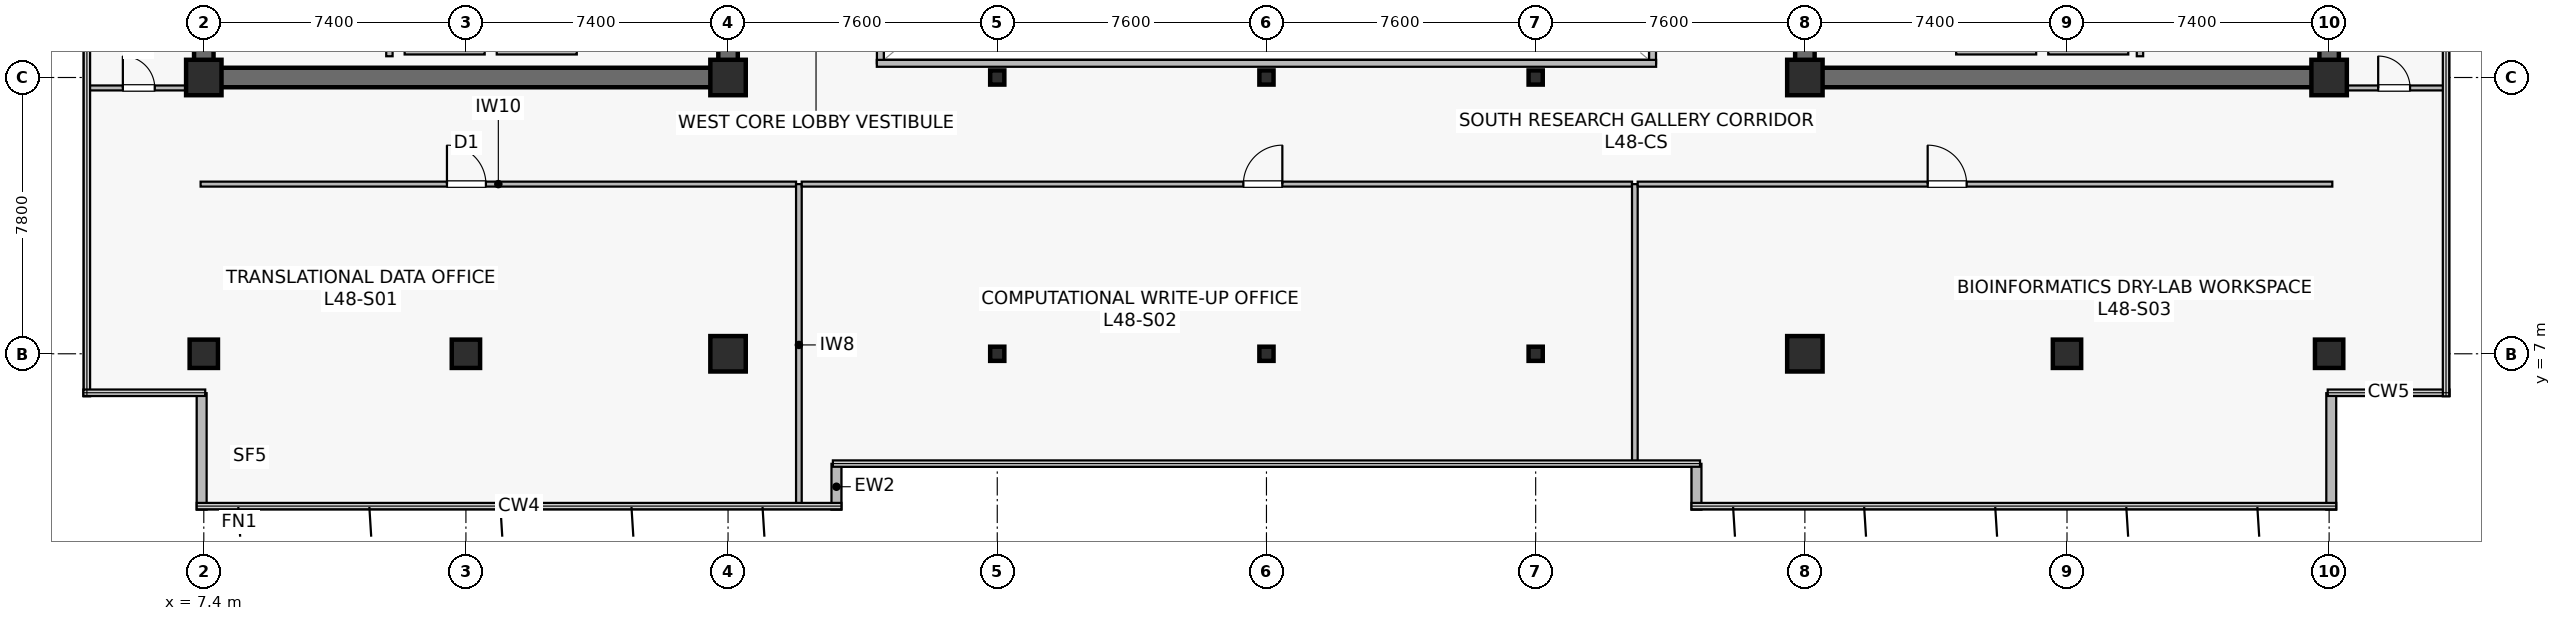
"""IFC4 building model, lengths in metres.
Left out: names, types, materials, properties, quantities, classifications, styles, units other than length and angle.
Written with IfcOpenShell. Run it as: python <this file> out.ifc"""

import sys

from ifc_helpers import new_model, si_unit, direction, frame, frame_2d, origin, origin_2d, place, context, subcontext, project, spatial, rectangle, hollow_rectangle, extrude, source, transform, mapped, element, fill, save


model = new_model("IFC4")
c1 = context("Model", 3, precision=1e-05, world=origin(), true_north=direction((0.0, 1.0)))
c2 = subcontext(c1, "Body", "Model", "MODEL_VIEW")
j1 = project(units=[si_unit("LENGTHUNIT", "METRE"), si_unit("PLANEANGLEUNIT", "RADIAN")], contexts=[c1])
p1 = place(None, origin())
s1 = spatial("IfcSite", under=j1, at=p1, CompositionType="ELEMENT")
p2 = place(p1, origin())
s2 = spatial("IfcBuilding", under=s1, at=p2, CompositionType="ELEMENT")
p3 = place(p2, frame((0.0, 0.0, 201.4)))
s3 = spatial("IfcBuildingStorey", under=s2, at=p3, CompositionType="ELEMENT", Elevation=201.4)
p4 = place(p3, frame((7.125, 14.8, 0.0), z_axis=(0.0, 0.0, 1.0), x_axis=(1.0, 0.0, 0.0)))
e1 = element("IfcWall", 1, at=p4, inside=s3, PredefinedType="SHEAR", context=c2, shape_type="SweptSolid", body=[
    extrude(rectangle(XDim=15.35, YDim=0.55, at=frame_2d((7.675, 0.0))), origin(), (0.0, 0.0, 1.0), 3.8),
])
p5 = place(p3, frame((7.4, 15.075, 0.0), z_axis=(0.0, 0.0, 1.0), x_axis=(0.0, 1.0, 0.0)))
e2 = element("IfcWall", 2, at=p5, inside=s3, PredefinedType="SHEAR", context=c2, shape_type="SweptSolid", body=[
    extrude(rectangle(XDim=18.45, YDim=0.55, at=frame_2d((9.225, 0.0))), origin(), (0.0, 0.0, 1.0), 3.8),
])
p6 = place(p3, frame((22.2, 15.075, 0.0), z_axis=(0.0, 0.0, 1.0), x_axis=(0.0, 1.0, 0.0)))
e3 = element("IfcWall", 3, at=p6, inside=s3, PredefinedType="SHEAR", context=c2, shape_type="SweptSolid", body=[
    extrude(rectangle(XDim=18.45, YDim=0.55, at=frame_2d((9.225, 0.0))), origin(), (0.0, 0.0, 1.0), 3.8),
])
p7 = place(p6, frame((3.475, 0.0, 0.0)))
e4 = element("IfcOpeningElement", 4, at=p7, cuts=e3, PredefinedType="OPENING", context=c2, shape_type="SweptSolid", body=[
    extrude(rectangle(XDim=1.42, YDim=2.2, at=frame_2d((0.71, 1.1))), frame((0.0, 0.285, 0.0), z_axis=(0.0, -1.0, 0.0), x_axis=(1.0, 0.0, 0.0)), (0.0, 0.0, 1.0), 0.57),
])
p8 = place(p3, frame((52.325, 14.8, 0.0), z_axis=(0.0, 0.0, 1.0), x_axis=(1.0, 0.0, 0.0)))
e5 = element("IfcWall", 5, at=p8, inside=s3, PredefinedType="SHEAR", context=c2, shape_type="SweptSolid", body=[
    extrude(rectangle(XDim=15.35, YDim=0.55, at=frame_2d((7.675, 0.0))), origin(), (0.0, 0.0, 1.0), 3.8),
])
p9 = place(p3, frame((52.6, 15.075, 0.0), z_axis=(0.0, 0.0, 1.0), x_axis=(0.0, 1.0, 0.0)))
e6 = element("IfcWall", 6, at=p9, inside=s3, PredefinedType="SHEAR", context=c2, shape_type="SweptSolid", body=[
    extrude(rectangle(XDim=18.45, YDim=0.55, at=frame_2d((9.225, 0.0))), origin(), (0.0, 0.0, 1.0), 3.8),
])
p10 = place(p9, frame((3.475, 0.0, 0.0)))
e7 = element("IfcOpeningElement", 7, at=p10, cuts=e6, PredefinedType="OPENING", context=c2, shape_type="SweptSolid", body=[
    extrude(rectangle(XDim=1.42, YDim=2.2, at=frame_2d((0.71, 1.1))), frame((0.0, 0.285, 0.0), z_axis=(0.0, -1.0, 0.0), x_axis=(1.0, 0.0, 0.0)), (0.0, 0.0, 1.0), 0.57),
])
p11 = place(p3, frame((67.4, 15.075, 0.0), z_axis=(0.0, 0.0, 1.0), x_axis=(0.0, 1.0, 0.0)))
e8 = element("IfcWall", 8, at=p11, inside=s3, PredefinedType="SHEAR", context=c2, shape_type="SweptSolid", body=[
    extrude(rectangle(XDim=18.45, YDim=0.55, at=frame_2d((9.225, 0.0))), origin(), (0.0, 0.0, 1.0), 3.8),
])
m1 = source(origin(), c2, "Body", "SweptSolid", [
    extrude(rectangle(XDim=0.8, YDim=0.8, at=origin_2d()), origin(), (0.0, 0.0, 1.0), 4.1),
])
p12 = place(p3, frame((14.8, 7.0, 0.0), z_axis=(0.0, 0.0, 1.0), x_axis=(1.0, 0.0, 0.0)))
e9 = element("IfcColumn", 9, at=p12, inside=s3, PredefinedType="COLUMN", context=c2, shape_type="MappedRepresentation", body=[
    mapped(m1, transform((0.0, 0.0, 0.0), scale=1.0)),
])
m2 = source(origin(), c2, "Body", "SweptSolid", [
    extrude(rectangle(XDim=1.0, YDim=1.0, at=origin_2d()), origin(), (0.0, 0.0, 1.0), 4.1),
])
for number, where, z_axis, x_axis in (
    (10, (22.2, 7.0, 0.0), (0.0, 0.0, 1.0), (1.0, 0.0, 0.0)),
    (11, (7.4, 14.8, 0.0), (0.0, 0.0, 1.0), (1.0, 0.0, 0.0)),
    (12, (22.2, 14.8, 0.0), (0.0, 0.0, 1.0), (1.0, 0.0, 0.0)),
    (13, (52.6, 7.0, 0.0), (0.0, 0.0, 1.0), (1.0, 0.0, 0.0)),
):
    element("IfcColumn", number, at=place(p3, frame(where, z_axis=z_axis, x_axis=x_axis)), inside=s3, PredefinedType="COLUMN", context=c2, shape_type="MappedRepresentation", body=[
        mapped(m2, transform((0.0, 0.0, 0.0), scale=1.0)),
    ])
p13 = place(p3, frame((60.0, 7.0, 0.0), z_axis=(0.0, 0.0, 1.0), x_axis=(1.0, 0.0, 0.0)))
e14 = element("IfcColumn", 14, at=p13, inside=s3, PredefinedType="COLUMN", context=c2, shape_type="MappedRepresentation", body=[
    mapped(m1, transform((0.0, 0.0, 0.0), scale=1.0)),
])
for number, where, z_axis, x_axis in (
    (15, (52.6, 14.8, 0.0), (0.0, 0.0, 1.0), (1.0, 0.0, 0.0)),
    (16, (67.4, 14.8, 0.0), (0.0, 0.0, 1.0), (1.0, 0.0, 0.0)),
):
    element("IfcColumn", number, at=place(p3, frame(where, z_axis=z_axis, x_axis=x_axis)), inside=s3, PredefinedType="COLUMN", context=c2, shape_type="MappedRepresentation", body=[
        mapped(m2, transform((0.0, 0.0, 0.0), scale=1.0)),
    ])
for number, where, z_axis, x_axis in (
    (17, (7.4, 7.0, 0.0), (0.0, 0.0, 1.0), (1.0, 0.0, 0.0)),
    (18, (67.4, 7.0, 0.0), (0.0, 0.0, 1.0), (1.0, 0.0, 0.0)),
):
    element("IfcColumn", number, at=place(p3, frame(where, z_axis=z_axis, x_axis=x_axis)), inside=s3, PredefinedType="COLUMN", context=c2, shape_type="MappedRepresentation", body=[
        mapped(m1, transform((0.0, 0.0, 0.0), scale=1.0)),
    ])
m3 = source(origin(), c2, "Body", "SweptSolid", [
    extrude(hollow_rectangle(XDim=0.4, YDim=0.4, WallThickness=0.019, at=origin_2d()), origin(), (0.0, 0.0, 1.0), 4.1),
])
for number, where, z_axis, x_axis in (
    (19, (29.8, 7.0, 0.0), (0.0, 0.0, 1.0), (1.0, 0.0, 0.0)),
    (20, (29.8, 14.8, 0.0), (0.0, 0.0, 1.0), (1.0, 0.0, 0.0)),
    (21, (37.4, 7.0, 0.0), (0.0, 0.0, 1.0), (1.0, 0.0, 0.0)),
    (22, (37.4, 14.8, 0.0), (0.0, 0.0, 1.0), (1.0, 0.0, 0.0)),
    (23, (45.0, 7.0, 0.0), (0.0, 0.0, 1.0), (1.0, 0.0, 0.0)),
    (24, (45.0, 14.8, 0.0), (0.0, 0.0, 1.0), (1.0, 0.0, 0.0)),
):
    element("IfcColumn", number, at=place(p3, frame(where, z_axis=z_axis, x_axis=x_axis)), inside=s3, PredefinedType="COLUMN", context=c2, shape_type="MappedRepresentation", body=[
        mapped(m3, transform((0.0, 0.0, 0.0), scale=1.0)),
    ])
for number, where, z_axis, x_axis in (
    (25, (25.26, 2.6, 0.0), (0.0, 0.0, 1.0), (0.0, 1.0, 0.0)),
    (26, (49.54, 3.893, 0.0), (0.0, 0.0, 1.0), (0.0, -1.0, 0.0)),
):
    element("IfcWall", number, at=place(p3, frame(where, z_axis=z_axis, x_axis=x_axis)), inside=s3, PredefinedType="STANDARD", context=c2, shape_type="SweptSolid", body=[
        extrude(rectangle(XDim=1.293, YDim=0.28, at=frame_2d((0.646, 0.0))), origin(), (0.0, 0.0, 1.0), 3.8),
    ])
for number, where, z_axis, x_axis in (
    (27, (67.46, 2.6, 0.0), (0.0, 0.0, 1.0), (0.0, 1.0, 0.0)),
    (28, (7.34, 5.888, 0.0), (0.0, 0.0, 1.0), (0.0, -1.0, 0.0)),
):
    element("IfcWall", number, at=place(p3, frame(where, z_axis=z_axis, x_axis=x_axis)), inside=s3, PredefinedType="STANDARD", context=c2, shape_type="SweptSolid", body=[
        extrude(rectangle(XDim=3.288, YDim=0.28, at=frame_2d((1.644, 0.0))), origin(), (0.0, 0.0, 1.0), 3.8),
    ])
p14 = place(p3, frame((13.07, 15.55, 0.0), z_axis=(0.0, 0.0, 1.0), x_axis=(1.0, 0.0, 0.0)))
e29 = element("IfcWall", 29, at=p14, inside=s3, PredefinedType="SOLIDWALL", context=c2, shape_type="SweptSolid", body=[
    extrude(rectangle(XDim=2.26, YDim=0.2, at=frame_2d((1.13, 0.0))), origin(), (0.0, 0.0, 1.0), 3.197),
])
p15 = place(p3, frame((15.67, 15.55, 0.0), z_axis=(0.0, 0.0, 1.0), x_axis=(1.0, 0.0, 0.0)))
e30 = element("IfcWall", 30, at=p15, inside=s3, PredefinedType="SOLIDWALL", context=c2, shape_type="SweptSolid", body=[
    extrude(rectangle(XDim=2.26, YDim=0.2, at=frame_2d((1.13, 0.0))), origin(), (0.0, 0.0, 1.0), 3.8),
])
p16 = place(p3, frame((12.64, 15.4, 0.0), z_axis=(0.0, 0.0, 1.0), x_axis=(0.0, 1.0, 0.0)))
e31 = element("IfcWall", 31, at=p16, inside=s3, PredefinedType="SOLIDWALL", context=c2, shape_type="SweptSolid", body=[
    extrude(rectangle(XDim=2.4, YDim=0.18, at=frame_2d((1.2, 0.0))), origin(), (0.0, 0.0, 1.0), 3.8),
])
p17 = place(p3, frame((59.47, 15.55, 0.0), z_axis=(0.0, 0.0, 1.0), x_axis=(1.0, 0.0, 0.0)))
e32 = element("IfcWall", 32, at=p17, inside=s3, PredefinedType="SOLIDWALL", context=c2, shape_type="SweptSolid", body=[
    extrude(rectangle(XDim=2.26, YDim=0.2, at=frame_2d((1.13, 0.0))), origin(), (0.0, 0.0, 1.0), 3.197),
])
p18 = place(p3, frame((56.87, 15.55, 0.0), z_axis=(0.0, 0.0, 1.0), x_axis=(1.0, 0.0, 0.0)))
e33 = element("IfcWall", 33, at=p18, inside=s3, PredefinedType="SOLIDWALL", context=c2, shape_type="SweptSolid", body=[
    extrude(rectangle(XDim=2.26, YDim=0.2, at=frame_2d((1.13, 0.0))), origin(), (0.0, 0.0, 1.0), 3.8),
])
p19 = place(p3, frame((62.06, 15.4, 0.0), z_axis=(0.0, 0.0, 1.0), x_axis=(0.0, 1.0, 0.0)))
e34 = element("IfcWall", 34, at=p19, inside=s3, PredefinedType="SOLIDWALL", context=c2, shape_type="SweptSolid", body=[
    extrude(rectangle(XDim=2.4, YDim=0.18, at=frame_2d((1.2, 0.0))), origin(), (0.0, 0.0, 1.0), 3.8),
])
p20 = place(p3, frame((26.5, 15.2, 0.0), z_axis=(0.0, 0.0, 1.0), x_axis=(0.0, 1.0, 0.0)))
e35 = element("IfcWall", 35, at=p20, inside=s3, PredefinedType="SOLIDWALL", context=c2, shape_type="SweptSolid", body=[
    extrude(rectangle(XDim=18.2, YDim=0.195, at=frame_2d((9.1, 0.0))), origin(), (0.0, 0.0, 1.0), 3.8),
])
p21 = place(p20, frame((1.8, 0.0, 0.9)))
e36 = element("IfcOpeningElement", 36, at=p21, cuts=e35, PredefinedType="OPENING", context=c2, shape_type="SweptSolid", body=[
    extrude(rectangle(XDim=1.5, YDim=1.4, at=frame_2d((0.75, 0.7))), frame((0.0, 0.107, 0.0), z_axis=(0.0, -1.0, 0.0), x_axis=(1.0, 0.0, 0.0)), (0.0, 0.0, 1.0), 0.215),
])
p22 = place(p20, frame((13.2, 0.0, 0.9)))
e37 = element("IfcOpeningElement", 37, at=p22, cuts=e35, PredefinedType="OPENING", context=c2, shape_type="SweptSolid", body=[
    extrude(rectangle(XDim=1.5, YDim=1.4, at=frame_2d((0.75, 0.7))), frame((0.0, 0.107, 0.0), z_axis=(0.0, -1.0, 0.0), x_axis=(1.0, 0.0, 0.0)), (0.0, 0.0, 1.0), 0.215),
])
p23 = place(p3, frame((48.3, 15.2, 0.0), z_axis=(0.0, 0.0, 1.0), x_axis=(0.0, 1.0, 0.0)))
e38 = element("IfcWall", 38, at=p23, inside=s3, PredefinedType="SOLIDWALL", context=c2, shape_type="SweptSolid", body=[
    extrude(rectangle(XDim=18.2, YDim=0.195, at=frame_2d((9.1, 0.0))), origin(), (0.0, 0.0, 1.0), 3.8),
])
p24 = place(p23, frame((1.8, 0.0, 0.9)))
e39 = element("IfcOpeningElement", 39, at=p24, cuts=e38, PredefinedType="OPENING", context=c2, shape_type="SweptSolid", body=[
    extrude(rectangle(XDim=1.5, YDim=1.4, at=frame_2d((0.75, 0.7))), frame((0.0, 0.107, 0.0), z_axis=(0.0, -1.0, 0.0), x_axis=(1.0, 0.0, 0.0)), (0.0, 0.0, 1.0), 0.215),
])
p25 = place(p23, frame((13.2, 0.0, 0.9)))
e40 = element("IfcOpeningElement", 40, at=p25, cuts=e38, PredefinedType="OPENING", context=c2, shape_type="SweptSolid", body=[
    extrude(rectangle(XDim=1.5, YDim=1.4, at=frame_2d((0.75, 0.7))), frame((0.0, 0.107, 0.0), z_axis=(0.0, -1.0, 0.0), x_axis=(1.0, 0.0, 0.0)), (0.0, 0.0, 1.0), 0.215),
])
p26 = place(p3, frame((26.4, 15.2, 0.0), z_axis=(0.0, 0.0, 1.0), x_axis=(1.0, 0.0, 0.0)))
e41 = element("IfcWall", 41, at=p26, inside=s3, PredefinedType="SOLIDWALL", context=c2, shape_type="SweptSolid", body=[
    extrude(rectangle(XDim=22.0, YDim=0.195, at=frame_2d((11.0, 0.0))), origin(), (0.0, 0.0, 1.0), 3.8),
])
p27 = place(p3, frame((7.31, 11.79, 0.0), z_axis=(0.0, 0.0, 1.0), x_axis=(1.0, 0.0, 0.0)))
e42 = element("IfcWall", 42, at=p27, inside=s3, PredefinedType="PARTITIONING", context=c2, shape_type="SweptSolid", body=[
    extrude(rectangle(XDim=16.81, YDim=0.14, at=frame_2d((8.405, 0.0))), origin(), (0.0, 0.0, 1.0), 3.197),
])
p28 = place(p27, frame((6.954, 0.0, 0.0)))
e43 = element("IfcOpeningElement", 43, at=p28, cuts=e42, PredefinedType="OPENING", context=c2, shape_type="SweptSolid", body=[
    extrude(rectangle(XDim=1.1, YDim=2.18, at=frame_2d((0.55, 1.09))), frame((0.0, 0.08, 0.0), z_axis=(0.0, -1.0, 0.0), x_axis=(1.0, 0.0, 0.0)), (0.0, 0.0, 1.0), 0.16),
])
p29 = place(p3, frame((24.2, 2.71, 0.0), z_axis=(0.0, 0.0, 1.0), x_axis=(0.0, 1.0, 0.0)))
e44 = element("IfcWall", 44, at=p29, inside=s3, PredefinedType="PARTITIONING", context=c2, shape_type="SweptSolid", body=[
    extrude(rectangle(XDim=9.08, YDim=0.16, at=frame_2d((4.54, 0.0))), origin(), (0.0, 0.0, 1.0), 3.135),
])
p30 = place(p3, frame((24.28, 11.79, 0.0), z_axis=(0.0, 0.0, 1.0), x_axis=(1.0, 0.0, 0.0)))
e45 = element("IfcWall", 45, at=p30, inside=s3, PredefinedType="PARTITIONING", context=c2, shape_type="SweptSolid", body=[
    extrude(rectangle(XDim=23.44, YDim=0.14, at=frame_2d((11.72, 0.0))), origin(), (0.0, 0.0, 1.0), 3.197),
])
p31 = place(p30, frame((12.469, 0.0, 0.0)))
e46 = element("IfcOpeningElement", 46, at=p31, cuts=e45, PredefinedType="OPENING", context=c2, shape_type="SweptSolid", body=[
    extrude(rectangle(XDim=1.1, YDim=2.18, at=frame_2d((0.55, 1.09))), frame((0.0, 0.08, 0.0), z_axis=(0.0, -1.0, 0.0), x_axis=(1.0, 0.0, 0.0)), (0.0, 0.0, 1.0), 0.16),
])
p32 = place(p3, frame((47.8, 3.91, 0.0), z_axis=(0.0, 0.0, 1.0), x_axis=(0.0, 1.0, 0.0)))
e47 = element("IfcWall", 47, at=p32, inside=s3, PredefinedType="PARTITIONING", context=c2, shape_type="SweptSolid", body=[
    extrude(rectangle(XDim=7.88, YDim=0.16, at=frame_2d((3.94, 0.0))), origin(), (0.0, 0.0, 1.0), 3.135),
])
p33 = place(p3, frame((47.88, 11.79, 0.0), z_axis=(0.0, 0.0, 1.0), x_axis=(1.0, 0.0, 0.0)))
e48 = element("IfcWall", 48, at=p33, inside=s3, PredefinedType="PARTITIONING", context=c2, shape_type="SweptSolid", body=[
    extrude(rectangle(XDim=19.61, YDim=0.14, at=frame_2d((9.805, 0.0))), origin(), (0.0, 0.0, 1.0), 3.197),
])
p34 = place(p33, frame((8.186, 0.0, 0.0)))
e49 = element("IfcOpeningElement", 49, at=p34, cuts=e48, PredefinedType="OPENING", context=c2, shape_type="SweptSolid", body=[
    extrude(rectangle(XDim=1.1, YDim=2.18, at=frame_2d((0.55, 1.09))), frame((0.0, 0.08, 0.0), z_axis=(0.0, -1.0, 0.0), x_axis=(1.0, 0.0, 0.0)), (0.0, 0.0, 1.0), 0.16),
])
p35 = place(p3, frame((4.11, 14.505, 0.0), z_axis=(0.0, 0.0, 1.0), x_axis=(1.0, 0.0, 0.0)))
e50 = element("IfcWall", 50, at=p35, inside=s3, PredefinedType="PARTITIONING", context=c2, shape_type="SweptSolid", body=[
    extrude(rectangle(XDim=2.91, YDim=0.14, at=frame_2d((1.455, 0.0))), origin(), (0.0, 0.0, 1.0), 3.8),
])
p36 = place(p35, frame((1.005, 0.0, 0.0)))
e51 = element("IfcOpeningElement", 51, at=p36, cuts=e50, PredefinedType="OPENING", context=c2, shape_type="SweptSolid", body=[
    extrude(rectangle(XDim=0.9, YDim=2.1, at=frame_2d((0.45, 1.05))), frame((0.0, 0.08, 0.0), z_axis=(0.0, -1.0, 0.0), x_axis=(1.0, 0.0, 0.0)), (0.0, 0.0, 1.0), 0.16),
])
p37 = place(p3, frame((67.78, 14.505, 0.0), z_axis=(0.0, 0.0, 1.0), x_axis=(1.0, 0.0, 0.0)))
e52 = element("IfcWall", 52, at=p37, inside=s3, PredefinedType="PARTITIONING", context=c2, shape_type="SweptSolid", body=[
    extrude(rectangle(XDim=2.91, YDim=0.14, at=frame_2d((1.455, 0.0))), origin(), (0.0, 0.0, 1.0), 3.8),
])
p38 = place(p37, frame((1.005, 0.0, 0.0)))
e53 = element("IfcOpeningElement", 53, at=p38, cuts=e52, PredefinedType="OPENING", context=c2, shape_type="SweptSolid", body=[
    extrude(rectangle(XDim=0.9, YDim=2.1, at=frame_2d((0.45, 1.05))), frame((0.0, 0.08, 0.0), z_axis=(0.0, -1.0, 0.0), x_axis=(1.0, 0.0, 0.0)), (0.0, 0.0, 1.0), 0.16),
])
m4 = source(origin(), c2, "Body", "SweptSolid", [
    extrude(rectangle(XDim=1.1, YDim=2.18, at=frame_2d((0.55, 1.09))), frame((0.0, 0.025, 0.0), z_axis=(0.0, -1.0, 0.0), x_axis=(1.0, 0.0, 0.0)), (0.0, 0.0, 1.0), 0.05),
])
p39 = place(p28, origin())
e54 = element("IfcDoor", 54, at=p39, inside=s3, OperationType="SINGLE_SWING_LEFT", PredefinedType="DOOR", context=c2, shape_type="MappedRepresentation", body=[
    mapped(m4, transform((0.0, 0.0, 0.0), scale=1.0)),
])
fill(e43, e54)
p40 = place(p31, origin())
e55 = element("IfcDoor", 55, at=p40, inside=s3, OperationType="SINGLE_SWING_RIGHT", PredefinedType="DOOR", context=c2, shape_type="MappedRepresentation", body=[
    mapped(m4, transform((0.0, 0.0, 0.0), scale=1.0)),
])
fill(e46, e55)
p41 = place(p34, origin())
e56 = element("IfcDoor", 56, at=p41, inside=s3, OperationType="SINGLE_SWING_LEFT", PredefinedType="DOOR", context=c2, shape_type="MappedRepresentation", body=[
    mapped(m4, transform((0.0, 0.0, 0.0), scale=1.0)),
])
fill(e49, e56)
m5 = source(origin(), c2, "Body", "SweptSolid", [
    extrude(rectangle(XDim=0.9, YDim=2.1, at=frame_2d((0.45, 1.05))), frame((0.0, 0.025, 0.0), z_axis=(0.0, -1.0, 0.0), x_axis=(1.0, 0.0, 0.0)), (0.0, 0.0, 1.0), 0.05),
])
p42 = place(p36, origin())
e57 = element("IfcDoor", 57, at=p42, inside=s3, OperationType="SINGLE_SWING_LEFT", PredefinedType="DOOR", context=c2, shape_type="MappedRepresentation", body=[
    mapped(m5, transform((0.0, 0.0, 0.0), scale=1.0)),
])
fill(e51, e57)
p43 = place(p38, origin())
e58 = element("IfcDoor", 58, at=p43, inside=s3, OperationType="SINGLE_SWING_LEFT", PredefinedType="DOOR", context=c2, shape_type="MappedRepresentation", body=[
    mapped(m5, transform((0.0, 0.0, 0.0), scale=1.0)),
])
fill(e53, e58)
save(model, sys.argv[1])
